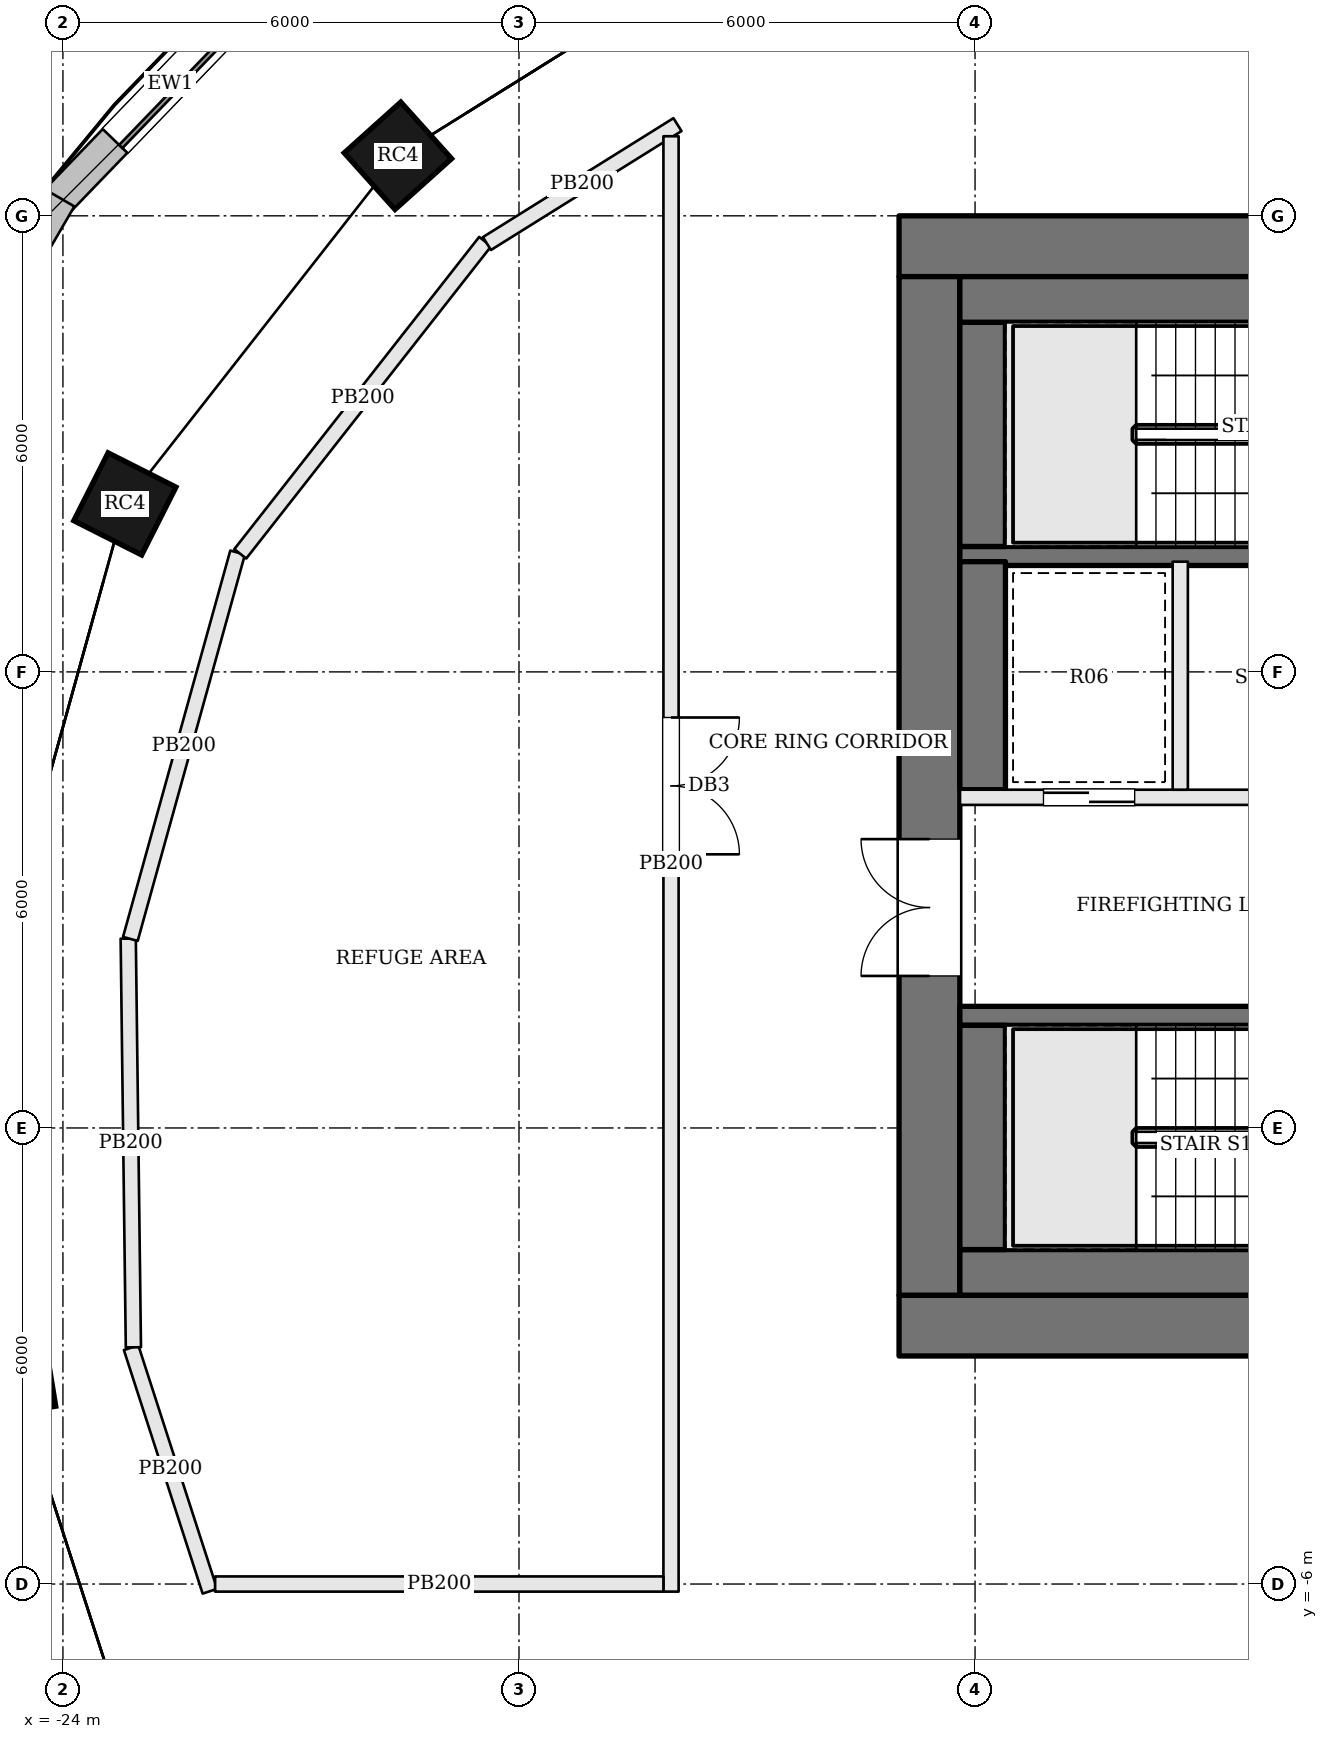
"""IFC4 building model, lengths in metres.
Left out: names, types, materials, properties, quantities, classifications, styles, units other than length and angle.
Written with IfcOpenShell. Run it as: python <this file> out.ifc"""

import sys

from ifc_helpers import new_model, si_unit, direction, frame, frame_2d, origin, origin_2d, place, context, subcontext, project, spatial, rectangle, extrude, element, fill, save


model = new_model("IFC4")
c1 = context("Model", 3, precision=1e-05, world=origin(), true_north=direction((0.0, 1.0)))
c2 = subcontext(c1, "Body", "Model", "MODEL_VIEW")
j1 = project(units=[si_unit("LENGTHUNIT", "METRE"), si_unit("PLANEANGLEUNIT", "RADIAN")], contexts=[c1])
p1 = place(None, origin())
s1 = spatial("IfcSite", under=j1, at=p1, CompositionType="ELEMENT")
p2 = place(p1, origin())
s2 = spatial("IfcBuilding", under=s1, at=p2, CompositionType="ELEMENT")
p3 = place(p2, frame((0.0, 0.0, 216.9)))
s3 = spatial("IfcBuildingStorey", under=s2, at=p3, CompositionType="ELEMENT", Elevation=216.9)
p4 = place(p3, frame((-13.0, 11.6, 0.0), z_axis=(0.0, 0.0, 1.0), x_axis=(1.0, 0.0, 0.0)))
e1 = element("IfcWall", 1, at=p4, inside=s3, PredefinedType="SHEAR", context=c2, shape_type="SweptSolid", body=[
    extrude(rectangle(XDim=26.0, YDim=0.8, at=frame_2d((13.0, 0.0))), origin(), (0.0, 0.0, 1.0), 4.5),
])
p5 = place(p4, frame((8.975, 0.0, 0.0)))
e2 = element("IfcOpeningElement", 2, at=p5, cuts=e1, PredefinedType="OPENING", context=c2, shape_type="SweptSolid", body=[
    extrude(rectangle(XDim=0.7, YDim=2.1, at=frame_2d((0.35, 1.05))), frame((0.0, 0.41, 0.0), z_axis=(0.0, -1.0, 0.0), x_axis=(1.0, 0.0, 0.0)), (0.0, 0.0, 1.0), 0.82),
])
p6 = place(p4, frame((11.575, 0.0, 0.0)))
e3 = element("IfcOpeningElement", 3, at=p6, cuts=e1, PredefinedType="OPENING", context=c2, shape_type="SweptSolid", body=[
    extrude(rectangle(XDim=1.2, YDim=2.1, at=frame_2d((0.6, 1.05))), frame((0.0, 0.41, 0.0), z_axis=(0.0, -1.0, 0.0), x_axis=(1.0, 0.0, 0.0)), (0.0, 0.0, 1.0), 0.82),
])
p7 = place(p4, frame((14.675, 0.0, 0.0)))
e4 = element("IfcOpeningElement", 4, at=p7, cuts=e1, PredefinedType="OPENING", context=c2, shape_type="SweptSolid", body=[
    extrude(rectangle(XDim=0.7, YDim=2.1, at=frame_2d((0.35, 1.05))), frame((0.0, 0.41, 0.0), z_axis=(0.0, -1.0, 0.0), x_axis=(1.0, 0.0, 0.0)), (0.0, 0.0, 1.0), 0.82),
])
p8 = place(p4, frame((16.725, 0.0, 0.0)))
e5 = element("IfcOpeningElement", 5, at=p8, cuts=e1, PredefinedType="OPENING", context=c2, shape_type="SweptSolid", body=[
    extrude(rectangle(XDim=0.7, YDim=2.1, at=frame_2d((0.35, 1.05))), frame((0.0, 0.41, 0.0), z_axis=(0.0, -1.0, 0.0), x_axis=(1.0, 0.0, 0.0)), (0.0, 0.0, 1.0), 0.82),
])
p9 = place(p4, frame((6.88, 0.0, 0.0)))
e6 = element("IfcOpeningElement", 6, at=p9, cuts=e1, PredefinedType="OPENING", context=c2, shape_type="SweptSolid", body=[
    extrude(rectangle(XDim=1.0, YDim=2.1, at=frame_2d((0.5, 1.05))), frame((0.0, 0.41, 0.0), z_axis=(0.0, -1.0, 0.0), x_axis=(1.0, 0.0, 0.0)), (0.0, 0.0, 1.0), 0.82),
])
p10 = place(p4, frame((18.12, 0.0, 0.0)))
e7 = element("IfcOpeningElement", 7, at=p10, cuts=e1, PredefinedType="OPENING", context=c2, shape_type="SweptSolid", body=[
    extrude(rectangle(XDim=1.0, YDim=2.1, at=frame_2d((0.5, 1.05))), frame((0.0, 0.41, 0.0), z_axis=(0.0, -1.0, 0.0), x_axis=(1.0, 0.0, 0.0)), (0.0, 0.0, 1.0), 0.82),
])
p11 = place(p3, frame((-13.0, -2.6, 0.0), z_axis=(0.0, 0.0, 1.0), x_axis=(1.0, 0.0, 0.0)))
e8 = element("IfcWall", 8, at=p11, inside=s3, PredefinedType="SHEAR", context=c2, shape_type="SweptSolid", body=[
    extrude(rectangle(XDim=26.0, YDim=0.8, at=frame_2d((13.0, 0.0))), origin(), (0.0, 0.0, 1.0), 4.5),
])
p12 = place(p11, frame((9.125, 0.0, 0.0)))
e9 = element("IfcOpeningElement", 9, at=p12, cuts=e8, PredefinedType="OPENING", context=c2, shape_type="SweptSolid", body=[
    extrude(rectangle(XDim=1.2, YDim=2.1, at=frame_2d((0.6, 1.05))), frame((0.0, 0.41, 0.0), z_axis=(0.0, -1.0, 0.0), x_axis=(1.0, 0.0, 0.0)), (0.0, 0.0, 1.0), 0.82),
])
p13 = place(p11, frame((12.375, 0.0, 0.0)))
e10 = element("IfcOpeningElement", 10, at=p13, cuts=e8, PredefinedType="OPENING", context=c2, shape_type="SweptSolid", body=[
    extrude(rectangle(XDim=1.2, YDim=2.1, at=frame_2d((0.6, 1.05))), frame((0.0, 0.41, 0.0), z_axis=(0.0, -1.0, 0.0), x_axis=(1.0, 0.0, 0.0)), (0.0, 0.0, 1.0), 0.82),
])
p14 = place(p11, frame((15.65, 0.0, 0.0)))
e11 = element("IfcOpeningElement", 11, at=p14, cuts=e8, PredefinedType="OPENING", context=c2, shape_type="SweptSolid", body=[
    extrude(rectangle(XDim=1.2, YDim=2.1, at=frame_2d((0.6, 1.05))), frame((0.0, 0.41, 0.0), z_axis=(0.0, -1.0, 0.0), x_axis=(1.0, 0.0, 0.0)), (0.0, 0.0, 1.0), 0.82),
])
p15 = place(p11, frame((6.88, 0.0, 0.0)))
e12 = element("IfcOpeningElement", 12, at=p15, cuts=e8, PredefinedType="OPENING", context=c2, shape_type="SweptSolid", body=[
    extrude(rectangle(XDim=1.0, YDim=2.1, at=frame_2d((0.5, 1.05))), frame((0.0, 0.41, 0.0), z_axis=(0.0, -1.0, 0.0), x_axis=(1.0, 0.0, 0.0)), (0.0, 0.0, 1.0), 0.82),
])
p16 = place(p11, frame((18.12, 0.0, 0.0)))
e13 = element("IfcOpeningElement", 13, at=p16, cuts=e8, PredefinedType="OPENING", context=c2, shape_type="SweptSolid", body=[
    extrude(rectangle(XDim=1.0, YDim=2.1, at=frame_2d((0.5, 1.05))), frame((0.0, 0.41, 0.0), z_axis=(0.0, -1.0, 0.0), x_axis=(1.0, 0.0, 0.0)), (0.0, 0.0, 1.0), 0.82),
])
p17 = place(p3, frame((-12.6, -2.2, 0.0), z_axis=(0.0, 0.0, 1.0), x_axis=(0.0, 1.0, 0.0)))
e14 = element("IfcWall", 14, at=p17, inside=s3, PredefinedType="SHEAR", context=c2, shape_type="SweptSolid", body=[
    extrude(rectangle(XDim=13.4, YDim=0.8, at=frame_2d((6.7, 0.0))), origin(), (0.0, 0.0, 1.0), 4.5),
])
p18 = place(p17, frame((4.2, 0.0, 0.0)))
e15 = element("IfcOpeningElement", 15, at=p18, cuts=e14, PredefinedType="OPENING", context=c2, shape_type="SweptSolid", body=[
    extrude(rectangle(XDim=1.8, YDim=2.1, at=frame_2d((0.9, 1.05))), frame((0.0, 0.41, 0.0), z_axis=(0.0, -1.0, 0.0), x_axis=(1.0, 0.0, 0.0)), (0.0, 0.0, 1.0), 0.82),
])
for number, where, z_axis, x_axis in (
    (16, (-19.593, 12.79, 0.0), (0.0, 0.0, 1.0), (-0.744, -0.668, 0.0)),
    (17, (-23.185, 8.21, 0.0), (0.0, 0.0, 1.0), (-0.451, -0.893, 0.0)),
    (18, (-24.669, -3.248, 0.0), (0.0, 0.0, 1.0), (0.162, -0.987, 0.0)),
):
    element("IfcColumn", number, at=place(p3, frame(where, z_axis=z_axis, x_axis=x_axis)), inside=s3, PredefinedType="COLUMN", context=c2, shape_type="SweptSolid", body=[
        extrude(rectangle(XDim=1.0, YDim=1.0, at=origin_2d()), origin(), (0.0, 0.0, 1.0), 4.5),
    ])
p19 = place(p3, frame((-21.094, 15.288, 0.0), z_axis=(0.0, 0.0, 1.0), x_axis=(-0.69406513137, -0.719912212298, 0.0)))
e19 = element("IfcWall", 19, at=p19, inside=s3, PredefinedType="SOLIDWALL", context=c2, shape_type="SweptSolid", body=[
    extrude(rectangle(XDim=4.298, YDim=0.45, at=frame_2d((2.149, 0.0))), origin(), (0.0, 0.0, 1.0), 4.3),
])
p20 = place(p19, frame((1.099, 0.0, 1.2)))
e20 = element("IfcOpeningElement", 20, at=p20, cuts=e19, PredefinedType="OPENING", context=c2, shape_type="SweptSolid", body=[
    extrude(rectangle(XDim=2.1, YDim=1.8, at=frame_2d((1.05, 0.9))), frame((0.0, 0.235, 0.0), z_axis=(0.0, -1.0, 0.0), x_axis=(1.0, 0.0, 0.0)), (0.0, 0.0, 1.0), 0.47),
])
p21 = place(p3, frame((-24.044, 12.237, 0.0), z_axis=(0.0, 0.0, 1.0), x_axis=(-0.502203169453, -0.864749661227, 0.0)))
e21 = element("IfcWall", 21, at=p21, inside=s3, PredefinedType="SOLIDWALL", context=c2, shape_type="SweptSolid", body=[
    extrude(rectangle(XDim=4.353, YDim=0.45, at=frame_2d((2.176, 0.0))), origin(), (0.0, 0.0, 1.0), 4.3),
])
p22 = place(p21, frame((1.126, 0.0, 1.2)))
e22 = element("IfcOpeningElement", 22, at=p22, cuts=e21, PredefinedType="OPENING", context=c2, shape_type="SweptSolid", body=[
    extrude(rectangle(XDim=2.1, YDim=1.8, at=frame_2d((1.05, 0.9))), frame((0.0, 0.235, 0.0), z_axis=(0.0, -1.0, 0.0), x_axis=(1.0, 0.0, 0.0)), (0.0, 0.0, 1.0), 0.47),
])
p23 = place(p3, frame((-12.2, 1.475, 0.0), z_axis=(0.0, 0.0, 1.0), x_axis=(1.0, 0.0, 0.0)))
e23 = element("IfcWall", 23, at=p23, inside=s3, PredefinedType="SOLIDWALL", context=c2, shape_type="SweptSolid", body=[
    extrude(rectangle(XDim=7.1, YDim=0.25, at=frame_2d((3.55, 0.0))), origin(), (0.0, 0.0, 1.0), 4.3),
])
p24 = place(p23, frame((5.8, 0.0, 0.0)))
e24 = element("IfcOpeningElement", 24, at=p24, cuts=e23, PredefinedType="OPENING", context=c2, shape_type="SweptSolid", body=[
    extrude(rectangle(XDim=1.2, YDim=2.1, at=frame_2d((0.6, 1.05))), frame((0.0, 0.135, 0.0), z_axis=(0.0, -1.0, 0.0), x_axis=(1.0, 0.0, 0.0)), (0.0, 0.0, 1.0), 0.27),
])
p25 = place(p3, frame((-12.2, 4.35, 0.0), z_axis=(0.0, 0.0, 1.0), x_axis=(1.0, 0.0, 0.0)))
e25 = element("IfcWall", 25, at=p25, inside=s3, PredefinedType="SOLIDWALL", context=c2, shape_type="SweptSolid", body=[
    extrude(rectangle(XDim=7.1, YDim=0.2, at=frame_2d((3.55, 0.0))), origin(), (0.0, 0.0, 1.0), 4.3),
])
p26 = place(p25, frame((4.4, 0.0, 0.0)))
e26 = element("IfcOpeningElement", 26, at=p26, cuts=e25, PredefinedType="OPENING", context=c2, shape_type="SweptSolid", body=[
    extrude(rectangle(XDim=1.2, YDim=2.1, at=frame_2d((0.6, 1.05))), frame((0.0, 0.11, 0.0), z_axis=(0.0, -1.0, 0.0), x_axis=(1.0, 0.0, 0.0)), (0.0, 0.0, 1.0), 0.22),
])
p27 = place(p25, frame((1.1, 0.0, 0.0)))
e27 = element("IfcOpeningElement", 27, at=p27, cuts=e25, PredefinedType="OPENING", context=c2, shape_type="SweptSolid", body=[
    extrude(rectangle(XDim=1.2, YDim=2.1, at=frame_2d((0.6, 1.05))), frame((0.0, 0.11, 0.0), z_axis=(0.0, -1.0, 0.0), x_axis=(1.0, 0.0, 0.0)), (0.0, 0.0, 1.0), 0.22),
])
p28 = place(p3, frame((-12.2, 7.525, 0.0), z_axis=(0.0, 0.0, 1.0), x_axis=(1.0, 0.0, 0.0)))
e28 = element("IfcWall", 28, at=p28, inside=s3, PredefinedType="SOLIDWALL", context=c2, shape_type="SweptSolid", body=[
    extrude(rectangle(XDim=7.1, YDim=0.25, at=frame_2d((3.55, 0.0))), origin(), (0.0, 0.0, 1.0), 4.3),
])
p29 = place(p28, frame((5.8, 0.0, 0.0)))
e29 = element("IfcOpeningElement", 29, at=p29, cuts=e28, PredefinedType="OPENING", context=c2, shape_type="SweptSolid", body=[
    extrude(rectangle(XDim=1.2, YDim=2.1, at=frame_2d((0.6, 1.05))), frame((0.0, 0.135, 0.0), z_axis=(0.0, -1.0, 0.0), x_axis=(1.0, 0.0, 0.0)), (0.0, 0.0, 1.0), 0.27),
])
p30 = place(p3, frame((-9.3, 4.45, 0.0), z_axis=(0.0, 0.0, 1.0), x_axis=(0.0, 1.0, 0.0)))
e30 = element("IfcWall", 30, at=p30, inside=s3, PredefinedType="SOLIDWALL", context=c2, shape_type="SweptSolid", body=[
    extrude(rectangle(XDim=3.0, YDim=0.2, at=frame_2d((1.5, 0.0))), origin(), (0.0, 0.0, 1.0), 4.3),
])
p31 = place(p3, frame((-12.2, -1.9, 0.0), z_axis=(0.0, 0.0, 1.0), x_axis=(1.0, 0.0, 0.0)))
e31 = element("IfcWall", 31, at=p31, inside=s3, PredefinedType="SOLIDWALL", context=c2, shape_type="SweptSolid", body=[
    extrude(rectangle(XDim=6.08, YDim=0.6, at=frame_2d((3.04, 0.0))), origin(), (0.0, 0.0, 1.0), 4.3),
])
p32 = place(p3, frame((-11.9, -1.6, 0.0), z_axis=(0.0, 0.0, 1.0), x_axis=(0.0, 1.0, 0.0)))
e32 = element("IfcWall", 32, at=p32, inside=s3, PredefinedType="SOLIDWALL", context=c2, shape_type="SweptSolid", body=[
    extrude(rectangle(XDim=2.95, YDim=0.6, at=frame_2d((1.475, 0.0))), origin(), (0.0, 0.0, 1.0), 4.3),
])
p33 = place(p3, frame((-11.9, 4.45, 0.0), z_axis=(0.0, 0.0, 1.0), x_axis=(0.0, 1.0, 0.0)))
e33 = element("IfcWall", 33, at=p33, inside=s3, PredefinedType="SOLIDWALL", context=c2, shape_type="SweptSolid", body=[
    extrude(rectangle(XDim=3.0, YDim=0.6, at=frame_2d((1.5, 0.0))), origin(), (0.0, 0.0, 1.0), 4.3),
])
p34 = place(p3, frame((-11.9, 7.65, 0.0), z_axis=(0.0, 0.0, 1.0), x_axis=(0.0, 1.0, 0.0)))
e34 = element("IfcWall", 34, at=p34, inside=s3, PredefinedType="SOLIDWALL", context=c2, shape_type="SweptSolid", body=[
    extrude(rectangle(XDim=2.95, YDim=0.6, at=frame_2d((1.475, 0.0))), origin(), (0.0, 0.0, 1.0), 4.3),
])
p35 = place(p3, frame((-12.2, 10.9, 0.0), z_axis=(0.0, 0.0, 1.0), x_axis=(1.0, 0.0, 0.0)))
e35 = element("IfcWall", 35, at=p35, inside=s3, PredefinedType="SOLIDWALL", context=c2, shape_type="SweptSolid", body=[
    extrude(rectangle(XDim=6.08, YDim=0.6, at=frame_2d((3.04, 0.0))), origin(), (0.0, 0.0, 1.0), 4.3),
])
p36 = place(p3, frame((-22.067, -6.095, 0.0), z_axis=(0.0, 0.0, 1.0), x_axis=(-0.307710248707, 0.951480111637, 0.0)))
e36 = element("IfcWall", 36, at=p36, inside=s3, PredefinedType="PARTITIONING", context=c2, shape_type="SweptSolid", body=[
    extrude(rectangle(XDim=3.367, YDim=0.2, at=frame_2d((1.684, 0.0))), origin(), (0.0, 0.0, 1.0), 4.3),
])
p37 = place(p3, frame((-23.073, -2.886, 0.0), z_axis=(0.0, 0.0, 1.0), x_axis=(-0.012666982201, 0.999919770563, 0.0)))
e37 = element("IfcWall", 37, at=p37, inside=s3, PredefinedType="PARTITIONING", context=c2, shape_type="SweptSolid", body=[
    extrude(rectangle(XDim=5.377, YDim=0.2, at=frame_2d((2.689, 0.0))), origin(), (0.0, 0.0, 1.0), 4.3),
])
p38 = place(p3, frame((-23.113, 2.487, 0.0), z_axis=(0.0, 0.0, 1.0), x_axis=(0.267500643582, 0.963557681555, 0.0)))
e38 = element("IfcWall", 38, at=p38, inside=s3, PredefinedType="PARTITIONING", context=c2, shape_type="SweptSolid", body=[
    extrude(rectangle(XDim=5.275, YDim=0.2, at=frame_2d((2.638, 0.0))), origin(), (0.0, 0.0, 1.0), 4.3),
])
p39 = place(p3, frame((-21.667, 7.553, 0.0), z_axis=(0.0, 0.0, 1.0), x_axis=(0.617143909163, 0.786850300491, 0.0)))
e39 = element("IfcWall", 39, at=p39, inside=s3, PredefinedType="PARTITIONING", context=c2, shape_type="SweptSolid", body=[
    extrude(rectangle(XDim=5.221, YDim=0.2, at=frame_2d((2.61, 0.0))), origin(), (0.0, 0.0, 1.0), 4.3),
])
p40 = place(p3, frame((-18.422, 11.635, 0.0), z_axis=(0.0, 0.0, 1.0), x_axis=(0.848299824463, 0.529516201656, 0.0)))
e40 = element("IfcWall", 40, at=p40, inside=s3, PredefinedType="PARTITIONING", context=c2, shape_type="SweptSolid", body=[
    extrude(rectangle(XDim=2.955, YDim=0.2, at=frame_2d((1.478, 0.0))), origin(), (0.0, 0.0, 1.0), 4.3),
])
p41 = place(p3, frame((-16.0, 13.047, 0.0), z_axis=(0.0, 0.0, 1.0), x_axis=(0.0, -1.0, 0.0)))
e41 = element("IfcWall", 41, at=p41, inside=s3, PredefinedType="PARTITIONING", context=c2, shape_type="SweptSolid", body=[
    extrude(rectangle(XDim=19.147, YDim=0.2, at=frame_2d((9.574, 0.0))), origin(), (0.0, 0.0, 1.0), 4.3),
])
p42 = place(p41, frame((7.647, 0.0, 0.0)))
e42 = element("IfcOpeningElement", 42, at=p42, cuts=e41, PredefinedType="OPENING", context=c2, shape_type="SweptSolid", body=[
    extrude(rectangle(XDim=1.8, YDim=2.1, at=frame_2d((0.9, 1.05))), frame((0.0, 0.11, 0.0), z_axis=(0.0, -1.0, 0.0), x_axis=(1.0, 0.0, 0.0)), (0.0, 0.0, 1.0), 0.22),
])
p43 = place(p3, frame((-16.1, -6.0, 0.0), z_axis=(0.0, 0.0, 1.0), x_axis=(-1.0, 0.0, 0.0)))
e43 = element("IfcWall", 43, at=p43, inside=s3, PredefinedType="PARTITIONING", context=c2, shape_type="SweptSolid", body=[
    extrude(rectangle(XDim=5.898, YDim=0.2, at=frame_2d((2.949, 0.0))), origin(), (0.0, 0.0, 1.0), 4.3),
])
p44 = place(p20, origin())
e44 = element("IfcWindow", 44, at=p44, inside=s3, PartitioningType="SINGLE_PANEL", PredefinedType="WINDOW", context=c2, shape_type="SweptSolid", body=[
    extrude(rectangle(XDim=2.1, YDim=1.8, at=frame_2d((1.05, 0.9))), frame((0.0, 0.135, 0.0), z_axis=(0.0, -1.0, 0.0), x_axis=(1.0, 0.0, 0.0)), (0.0, 0.0, 1.0), 0.06),
])
fill(e20, e44)
p45 = place(p18, origin())
e45 = element("IfcDoor", 45, at=p45, inside=s3, OperationType="DOUBLE_DOOR_SINGLE_SWING", PredefinedType="DOOR", context=c2, shape_type="SweptSolid", body=[
    extrude(rectangle(XDim=1.8, YDim=2.1, at=frame_2d((0.9, 1.05))), frame((0.0, 0.025, 0.0), z_axis=(0.0, -1.0, 0.0), x_axis=(1.0, 0.0, 0.0)), (0.0, 0.0, 1.0), 0.05),
])
fill(e15, e45)
p46 = place(p27, origin())
e46 = element("IfcDoor", 46, at=p46, inside=s3, OperationType="SLIDING_TO_RIGHT", PredefinedType="DOOR", context=c2, shape_type="SweptSolid", body=[
    extrude(rectangle(XDim=1.2, YDim=2.1, at=frame_2d((0.6, 1.05))), frame((0.0, 0.025, 0.0), z_axis=(0.0, -1.0, 0.0), x_axis=(1.0, 0.0, 0.0)), (0.0, 0.0, 1.0), 0.05),
])
fill(e27, e46)
p47 = place(p42, origin())
e47 = element("IfcDoor", 47, at=p47, inside=s3, OperationType="DOUBLE_DOOR_SINGLE_SWING", PredefinedType="DOOR", context=c2, shape_type="SweptSolid", body=[
    extrude(rectangle(XDim=1.8, YDim=2.1, at=frame_2d((0.9, 1.05))), frame((0.0, 0.025, 0.0), z_axis=(0.0, -1.0, 0.0), x_axis=(1.0, 0.0, 0.0)), (0.0, 0.0, 1.0), 0.05),
])
fill(e42, e47)
save(model, sys.argv[1])
